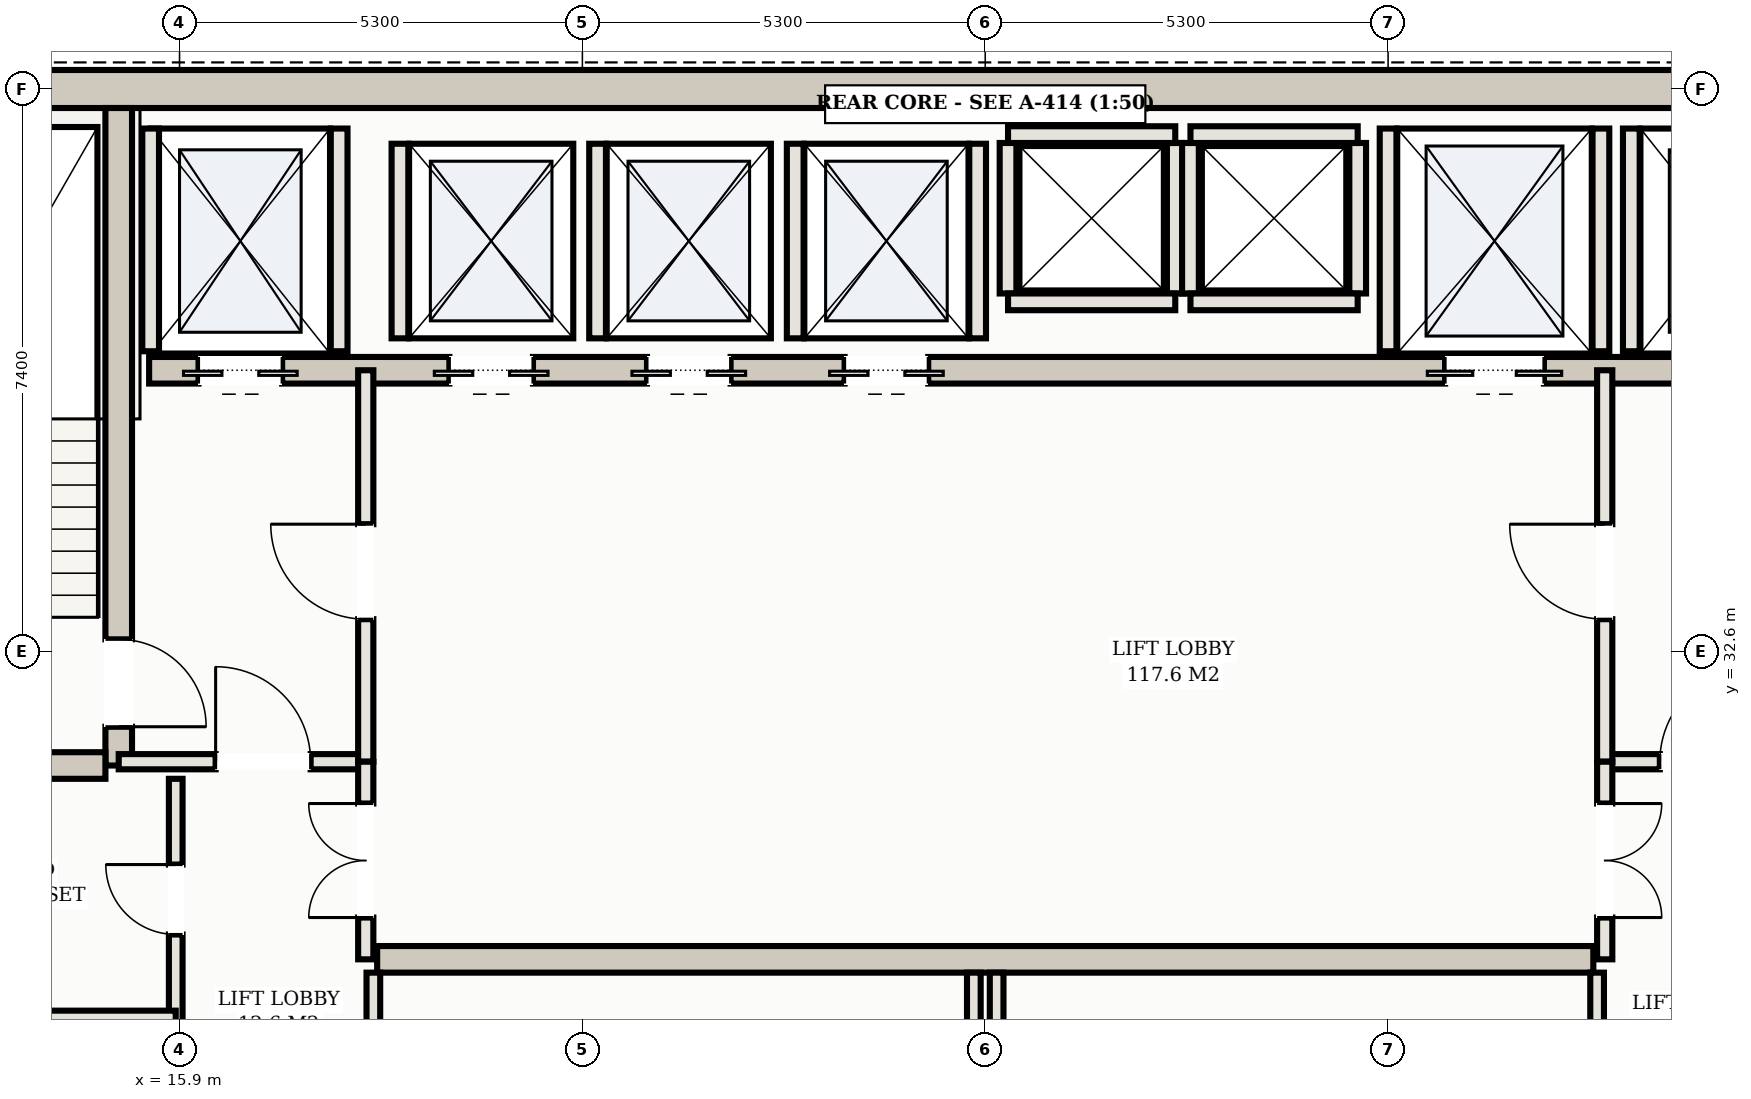
"""IFC4 building model, lengths in metres.
Left out: names, types, materials, properties, quantities, classifications, styles, units other than length and angle.
Written with IfcOpenShell. Run it as: python <this file> out.ifc"""

import sys

from ifc_helpers import new_model, si_unit, direction, frame, frame_2d, origin, place, context, subcontext, project, spatial, rectangle, extrude, element, fill, save


model = new_model("IFC4")
c1 = context("Model", 3, precision=1e-05, world=origin(), true_north=direction((0.0, 1.0)))
c2 = subcontext(c1, "Body", "Model", "MODEL_VIEW")
j1 = project(units=[si_unit("LENGTHUNIT", "METRE"), si_unit("PLANEANGLEUNIT", "RADIAN")], contexts=[c1])
p1 = place(None, origin())
s1 = spatial("IfcSite", under=j1, at=p1, CompositionType="ELEMENT")
p2 = place(p1, origin())
s2 = spatial("IfcBuilding", under=s1, at=p2, CompositionType="ELEMENT")
p3 = place(p2, frame((0.0, 0.0, 252.8)))
s3 = spatial("IfcBuildingStorey", under=s2, at=p3, CompositionType="ELEMENT", Elevation=252.8)
p4 = place(p3, frame((10.35, 40.0, 0.0), z_axis=(0.0, 0.0, 1.0), x_axis=(1.0, 0.0, 0.0)))
e1 = element("IfcWall", 1, at=p4, inside=s3, PredefinedType="SHEAR", context=c2, shape_type="SweptSolid", body=[
    extrude(rectangle(XDim=32.3, YDim=0.5, at=frame_2d((16.15, 0.0))), origin(), (0.0, 0.0, 1.0), 3.11),
])
p5 = place(p3, frame((15.1, 31.1, 0.0), z_axis=(0.0, 0.0, 1.0), x_axis=(0.0, 1.0, 0.0)))
e2 = element("IfcWall", 2, at=p5, inside=s3, PredefinedType="SHEAR", context=c2, shape_type="SweptSolid", body=[
    extrude(rectangle(XDim=8.65, YDim=0.35, at=frame_2d((4.325, 0.0))), origin(), (0.0, 0.0, 1.0), 3.11),
])
p6 = place(p5, frame((0.51, 0.0, 0.0)))
e3 = element("IfcOpeningElement", 3, at=p6, cuts=e2, PredefinedType="OPENING", context=c2, shape_type="SweptSolid", body=[
    extrude(rectangle(XDim=1.15, YDim=2.2, at=frame_2d((0.575, 1.1))), frame((0.0, 0.185, 0.0), z_axis=(0.0, -1.0, 0.0), x_axis=(1.0, 0.0, 0.0)), (0.0, 0.0, 1.0), 0.37),
])
p7 = place(p3, frame((10.85, 31.1, 0.0), z_axis=(0.0, 0.0, 1.0), x_axis=(1.0, 0.0, 0.0)))
e4 = element("IfcWall", 4, at=p7, inside=s3, PredefinedType="SHEAR", context=c2, shape_type="SweptSolid", body=[
    extrude(rectangle(XDim=4.075, YDim=0.35, at=frame_2d((2.038, 0.0))), origin(), (0.0, 0.0, 1.0), 3.11),
])
p8 = place(p3, frame((15.5, 36.3, 0.0), z_axis=(0.0, 0.0, 1.0), x_axis=(1.0, 0.0, 0.0)))
e5 = element("IfcWall", 5, at=p8, inside=s3, PredefinedType="SHEAR", context=c2, shape_type="SweptSolid", body=[
    extrude(rectangle(XDim=22.0, YDim=0.35, at=frame_2d((11.0, 0.0))), origin(), (0.0, 0.0, 1.0), 3.11),
])
p9 = place(p8, frame((0.65, 0.0, 0.0)))
e6 = element("IfcOpeningElement", 6, at=p9, cuts=e5, PredefinedType="OPENING", context=c2, shape_type="SweptSolid", body=[
    extrude(rectangle(XDim=1.1, YDim=2.15, at=frame_2d((0.55, 1.075))), frame((0.0, 0.185, 0.0), z_axis=(0.0, -1.0, 0.0), x_axis=(1.0, 0.0, 0.0)), (0.0, 0.0, 1.0), 0.37),
])
p10 = place(p8, frame((20.25, 0.0, 0.0)))
e7 = element("IfcOpeningElement", 7, at=p10, cuts=e5, PredefinedType="OPENING", context=c2, shape_type="SweptSolid", body=[
    extrude(rectangle(XDim=1.1, YDim=2.15, at=frame_2d((0.55, 1.075))), frame((0.0, 0.185, 0.0), z_axis=(0.0, -1.0, 0.0), x_axis=(1.0, 0.0, 0.0)), (0.0, 0.0, 1.0), 0.37),
])
p11 = place(p8, frame((17.05, 0.0, 0.0)))
e8 = element("IfcOpeningElement", 8, at=p11, cuts=e5, PredefinedType="OPENING", context=c2, shape_type="SweptSolid", body=[
    extrude(rectangle(XDim=1.3, YDim=2.2, at=frame_2d((0.65, 1.1))), frame((0.0, 0.185, 0.0), z_axis=(0.0, -1.0, 0.0), x_axis=(1.0, 0.0, 0.0)), (0.0, 0.0, 1.0), 0.37),
])
p12 = place(p8, frame((3.95, 0.0, 0.0)))
e9 = element("IfcOpeningElement", 9, at=p12, cuts=e5, PredefinedType="OPENING", context=c2, shape_type="SweptSolid", body=[
    extrude(rectangle(XDim=1.1, YDim=2.15, at=frame_2d((0.55, 1.075))), frame((0.0, 0.185, 0.0), z_axis=(0.0, -1.0, 0.0), x_axis=(1.0, 0.0, 0.0)), (0.0, 0.0, 1.0), 0.37),
])
p13 = place(p8, frame((6.55, 0.0, 0.0)))
e10 = element("IfcOpeningElement", 10, at=p13, cuts=e5, PredefinedType="OPENING", context=c2, shape_type="SweptSolid", body=[
    extrude(rectangle(XDim=1.1, YDim=2.15, at=frame_2d((0.55, 1.075))), frame((0.0, 0.185, 0.0), z_axis=(0.0, -1.0, 0.0), x_axis=(1.0, 0.0, 0.0)), (0.0, 0.0, 1.0), 0.37),
])
p14 = place(p8, frame((9.15, 0.0, 0.0)))
e11 = element("IfcOpeningElement", 11, at=p14, cuts=e5, PredefinedType="OPENING", context=c2, shape_type="SweptSolid", body=[
    extrude(rectangle(XDim=1.1, YDim=2.15, at=frame_2d((0.55, 1.075))), frame((0.0, 0.185, 0.0), z_axis=(0.0, -1.0, 0.0), x_axis=(1.0, 0.0, 0.0)), (0.0, 0.0, 1.0), 0.37),
])
p15 = place(p3, frame((18.5, 28.55, 0.0), z_axis=(0.0, 0.0, 1.0), x_axis=(1.0, 0.0, 0.0)))
e12 = element("IfcWall", 12, at=p15, inside=s3, PredefinedType="SHEAR", context=c2, shape_type="SweptSolid", body=[
    extrude(rectangle(XDim=16.0, YDim=0.35, at=frame_2d((8.0, 0.0))), origin(), (0.0, 0.0, 1.0), 3.11),
])
for number, where, z_axis, x_axis in (
    (13, (15.52, 36.55, 0.0), (0.0, 0.0, 1.0), (0.0, 1.0, 0.0)),
    (14, (18.0, 36.55, 0.0), (0.0, 0.0, 1.0), (0.0, 1.0, 0.0)),
    (15, (35.0, 36.55, 0.0), (0.0, 0.0, 1.0), (0.0, 1.0, 0.0)),
    (16, (31.8, 36.55, 0.0), (0.0, 0.0, 1.0), (0.0, 1.0, 0.0)),
    (17, (34.6, 36.55, 0.0), (0.0, 0.0, 1.0), (0.0, 1.0, 0.0)),
):
    element("IfcWall", number, at=place(p3, frame(where, z_axis=z_axis, x_axis=x_axis)), inside=s3, PredefinedType="SOLIDWALL", context=c2, shape_type="SweptSolid", body=[
        extrude(rectangle(XDim=2.93, YDim=0.22, at=frame_2d((1.465, 0.0))), origin(), (0.0, 0.0, 1.0), 3.11),
    ])
for number, where, z_axis, x_axis in (
    (18, (18.8, 36.72, 0.0), (0.0, 0.0, 1.0), (0.0, 1.0, 0.0)),
    (19, (21.4, 36.72, 0.0), (0.0, 0.0, 1.0), (0.0, 1.0, 0.0)),
    (20, (24.0, 36.72, 0.0), (0.0, 0.0, 1.0), (0.0, 1.0, 0.0)),
    (21, (26.4, 36.72, 0.0), (0.0, 0.0, 1.0), (0.0, 1.0, 0.0)),
):
    element("IfcWall", number, at=place(p3, frame(where, z_axis=z_axis, x_axis=x_axis)), inside=s3, PredefinedType="SOLIDWALL", context=c2, shape_type="SweptSolid", body=[
        extrude(rectangle(XDim=2.56, YDim=0.22, at=frame_2d((1.28, 0.0))), origin(), (0.0, 0.0, 1.0), 3.11),
    ])
for number, where, z_axis, x_axis in (
    (22, (26.8, 37.31, 0.0), (0.0, 0.0, 1.0), (0.0, 1.0, 0.0)),
    (23, (29.0, 37.31, 0.0), (0.0, 0.0, 1.0), (0.0, 1.0, 0.0)),
):
    element("IfcWall", number, at=place(p3, frame(where, z_axis=z_axis, x_axis=x_axis)), inside=s3, PredefinedType="SOLIDWALL", context=c2, shape_type="SweptSolid", body=[
        extrude(rectangle(XDim=1.98, YDim=0.22, at=frame_2d((0.99, 0.0))), origin(), (0.0, 0.0, 1.0), 3.11),
    ])
for number, where, z_axis, x_axis in (
    (24, (26.8, 39.4, 0.0), (0.0, 0.0, 1.0), (1.0, 0.0, 0.0)),
    (25, (26.8, 37.2, 0.0), (0.0, 0.0, 1.0), (1.0, 0.0, 0.0)),
):
    element("IfcWall", number, at=place(p3, frame(where, z_axis=z_axis, x_axis=x_axis)), inside=s3, PredefinedType="SOLIDWALL", context=c2, shape_type="SweptSolid", body=[
        extrude(rectangle(XDim=2.2, YDim=0.22, at=frame_2d((1.1, 0.0))), origin(), (0.0, 0.0, 1.0), 3.11),
    ])
for number, where, z_axis, x_axis in (
    (26, (29.2, 37.31, 0.0), (0.0, 0.0, 1.0), (0.0, 1.0, 0.0)),
    (27, (31.4, 37.31, 0.0), (0.0, 0.0, 1.0), (0.0, 1.0, 0.0)),
):
    element("IfcWall", number, at=place(p3, frame(where, z_axis=z_axis, x_axis=x_axis)), inside=s3, PredefinedType="SOLIDWALL", context=c2, shape_type="SweptSolid", body=[
        extrude(rectangle(XDim=1.98, YDim=0.22, at=frame_2d((0.99, 0.0))), origin(), (0.0, 0.0, 1.0), 3.11),
    ])
for number, where, z_axis, x_axis in (
    (28, (29.2, 39.4, 0.0), (0.0, 0.0, 1.0), (1.0, 0.0, 0.0)),
    (29, (29.2, 37.2, 0.0), (0.0, 0.0, 1.0), (1.0, 0.0, 0.0)),
):
    element("IfcWall", number, at=place(p3, frame(where, z_axis=z_axis, x_axis=x_axis)), inside=s3, PredefinedType="SOLIDWALL", context=c2, shape_type="SweptSolid", body=[
        extrude(rectangle(XDim=2.2, YDim=0.22, at=frame_2d((1.1, 0.0))), origin(), (0.0, 0.0, 1.0), 3.11),
    ])
p16 = place(p3, frame((15.1, 31.15, 0.0), z_axis=(0.0, 0.0, 1.0), x_axis=(1.0, 0.0, 0.0)))
e30 = element("IfcWall", 30, at=p16, inside=s3, PredefinedType="PARTITIONING", context=c2, shape_type="SweptSolid", body=[
    extrude(rectangle(XDim=3.25, YDim=0.2, at=frame_2d((1.625, 0.0))), origin(), (0.0, 0.0, 1.0), 2.45),
])
p17 = place(p16, frame((1.275, 0.0, 0.0)))
e31 = element("IfcOpeningElement", 31, at=p17, cuts=e30, PredefinedType="OPENING", context=c2, shape_type="SweptSolid", body=[
    extrude(rectangle(XDim=1.25, YDim=2.2, at=frame_2d((0.625, 1.1))), frame((0.0, 0.11, 0.0), z_axis=(0.0, -1.0, 0.0), x_axis=(1.0, 0.0, 0.0)), (0.0, 0.0, 1.0), 0.22),
])
p18 = place(p3, frame((18.35, 31.15, 0.0), z_axis=(0.0, 0.0, 1.0), x_axis=(0.0, 1.0, 0.0)))
e32 = element("IfcWall", 32, at=p18, inside=s3, PredefinedType="PARTITIONING", context=c2, shape_type="SweptSolid", body=[
    extrude(rectangle(XDim=5.15, YDim=0.2, at=frame_2d((2.575, 0.0))), origin(), (0.0, 0.0, 1.0), 2.45),
])
p19 = place(p18, frame((1.875, 0.0, 0.0)))
e33 = element("IfcOpeningElement", 33, at=p19, cuts=e32, PredefinedType="OPENING", context=c2, shape_type="SweptSolid", body=[
    extrude(rectangle(XDim=1.25, YDim=2.2, at=frame_2d((0.625, 1.1))), frame((0.0, 0.11, 0.0), z_axis=(0.0, -1.0, 0.0), x_axis=(1.0, 0.0, 0.0)), (0.0, 0.0, 1.0), 0.22),
])
p20 = place(p3, frame((34.65, 31.15, 0.0), z_axis=(0.0, 0.0, 1.0), x_axis=(1.0, 0.0, 0.0)))
e34 = element("IfcWall", 34, at=p20, inside=s3, PredefinedType="PARTITIONING", context=c2, shape_type="SweptSolid", body=[
    extrude(rectangle(XDim=3.25, YDim=0.2, at=frame_2d((1.625, 0.0))), origin(), (0.0, 0.0, 1.0), 2.45),
])
p21 = place(p20, frame((0.725, 0.0, 0.0)))
e35 = element("IfcOpeningElement", 35, at=p21, cuts=e34, PredefinedType="OPENING", context=c2, shape_type="SweptSolid", body=[
    extrude(rectangle(XDim=1.25, YDim=2.2, at=frame_2d((0.625, 1.1))), frame((0.0, 0.11, 0.0), z_axis=(0.0, -1.0, 0.0), x_axis=(1.0, 0.0, 0.0)), (0.0, 0.0, 1.0), 0.22),
])
p22 = place(p3, frame((34.65, 31.15, 0.0), z_axis=(0.0, 0.0, 1.0), x_axis=(0.0, 1.0, 0.0)))
e36 = element("IfcWall", 36, at=p22, inside=s3, PredefinedType="PARTITIONING", context=c2, shape_type="SweptSolid", body=[
    extrude(rectangle(XDim=5.15, YDim=0.2, at=frame_2d((2.575, 0.0))), origin(), (0.0, 0.0, 1.0), 2.45),
])
p23 = place(p22, frame((1.875, 0.0, 0.0)))
e37 = element("IfcOpeningElement", 37, at=p23, cuts=e36, PredefinedType="OPENING", context=c2, shape_type="SweptSolid", body=[
    extrude(rectangle(XDim=1.25, YDim=2.2, at=frame_2d((0.625, 1.1))), frame((0.0, 0.11, 0.0), z_axis=(0.0, -1.0, 0.0), x_axis=(1.0, 0.0, 0.0)), (0.0, 0.0, 1.0), 0.22),
])
p24 = place(p3, frame((15.85, 25.45, 0.0), z_axis=(0.0, 0.0, 1.0), x_axis=(0.0, 1.0, 0.0)))
e38 = element("IfcWall", 38, at=p24, inside=s3, PredefinedType="PARTITIONING", context=c2, shape_type="SweptSolid", body=[
    extrude(rectangle(XDim=5.475, YDim=0.18, at=frame_2d((2.738, 0.0))), origin(), (0.0, 0.0, 1.0), 2.45),
])
p25 = place(p24, frame((0.74, 0.0, 0.0)))
e39 = element("IfcOpeningElement", 39, at=p25, cuts=e38, PredefinedType="OPENING", context=c2, shape_type="SweptSolid", body=[
    extrude(rectangle(XDim=0.92, YDim=2.15, at=frame_2d((0.46, 1.075))), frame((0.0, 0.1, 0.0), z_axis=(0.0, -1.0, 0.0), x_axis=(1.0, 0.0, 0.0)), (0.0, 0.0, 1.0), 0.2),
])
p26 = place(p24, frame((3.427, 0.0, 0.0)))
e40 = element("IfcOpeningElement", 40, at=p26, cuts=e38, PredefinedType="OPENING", context=c2, shape_type="SweptSolid", body=[
    extrude(rectangle(XDim=0.92, YDim=2.15, at=frame_2d((0.46, 1.075))), frame((0.0, 0.1, 0.0), z_axis=(0.0, -1.0, 0.0), x_axis=(1.0, 0.0, 0.0)), (0.0, 0.0, 1.0), 0.2),
])
p27 = place(p3, frame((10.85, 27.8, 0.0), z_axis=(0.0, 0.0, 1.0), x_axis=(1.0, 0.0, 0.0)))
e41 = element("IfcWall", 41, at=p27, inside=s3, PredefinedType="PARTITIONING", context=c2, shape_type="SweptSolid", body=[
    extrude(rectangle(XDim=5.0, YDim=0.15, at=frame_2d((2.5, 0.0))), origin(), (0.0, 0.0, 1.0), 2.45),
])
p28 = place(p3, frame((18.35, 28.55, 0.0), z_axis=(0.0, 0.0, 1.0), x_axis=(0.0, 1.0, 0.0)))
e42 = element("IfcWall", 42, at=p28, inside=s3, PredefinedType="PARTITIONING", context=c2, shape_type="SweptSolid", body=[
    extrude(rectangle(XDim=2.6, YDim=0.2, at=frame_2d((1.3, 0.0))), origin(), (0.0, 0.0, 1.0), 2.45),
])
p29 = place(p28, frame((0.55, 0.0, 0.0)))
e43 = element("IfcOpeningElement", 43, at=p29, cuts=e42, PredefinedType="OPENING", context=c2, shape_type="SweptSolid", body=[
    extrude(rectangle(XDim=1.5, YDim=2.25, at=frame_2d((0.75, 1.125))), frame((0.0, 0.11, 0.0), z_axis=(0.0, -1.0, 0.0), x_axis=(1.0, 0.0, 0.0)), (0.0, 0.0, 1.0), 0.22),
])
p30 = place(p3, frame((34.65, 28.55, 0.0), z_axis=(0.0, 0.0, 1.0), x_axis=(0.0, 1.0, 0.0)))
e44 = element("IfcWall", 44, at=p30, inside=s3, PredefinedType="PARTITIONING", context=c2, shape_type="SweptSolid", body=[
    extrude(rectangle(XDim=2.6, YDim=0.2, at=frame_2d((1.3, 0.0))), origin(), (0.0, 0.0, 1.0), 2.45),
])
p31 = place(p30, frame((0.55, 0.0, 0.0)))
e45 = element("IfcOpeningElement", 45, at=p31, cuts=e44, PredefinedType="OPENING", context=c2, shape_type="SweptSolid", body=[
    extrude(rectangle(XDim=1.5, YDim=2.25, at=frame_2d((0.75, 1.125))), frame((0.0, 0.11, 0.0), z_axis=(0.0, -1.0, 0.0), x_axis=(1.0, 0.0, 0.0)), (0.0, 0.0, 1.0), 0.22),
])
for number, where, z_axis, x_axis in (
    (46, (18.45, 25.62, 0.0), (0.0, 0.0, 1.0), (0.0, 1.0, 0.0)),
    (47, (26.35, 25.62, 0.0), (0.0, 0.0, 1.0), (0.0, 1.0, 0.0)),
    (48, (26.65, 25.62, 0.0), (0.0, 0.0, 1.0), (0.0, 1.0, 0.0)),
    (49, (34.55, 25.62, 0.0), (0.0, 0.0, 1.0), (0.0, 1.0, 0.0)),
):
    element("IfcWall", number, at=place(p3, frame(where, z_axis=z_axis, x_axis=x_axis)), inside=s3, PredefinedType="PARTITIONING", context=c2, shape_type="SweptSolid", body=[
        extrude(rectangle(XDim=2.755, YDim=0.18, at=frame_2d((1.377, 0.0))), origin(), (0.0, 0.0, 1.0), 2.45),
    ])
p32 = place(p9, frame((1.1, 0.0, 0.0), z_axis=(0.0, 0.0, 1.0), x_axis=(-1.0, 0.0, 0.0)))
e50 = element("IfcDoor", 50, at=p32, inside=s3, OperationType="DOUBLE_DOOR_SLIDING", PredefinedType="DOOR", context=c2, shape_type="SweptSolid", body=[
    extrude(rectangle(XDim=1.1, YDim=2.15, at=frame_2d((0.55, 1.075))), frame((0.0, 0.025, 0.0), z_axis=(0.0, -1.0, 0.0), x_axis=(1.0, 0.0, 0.0)), (0.0, 0.0, 1.0), 0.05),
])
fill(e6, e50)
p33 = place(p11, frame((1.3, 0.0, 0.0), z_axis=(0.0, 0.0, 1.0), x_axis=(-1.0, 0.0, 0.0)))
e51 = element("IfcDoor", 51, at=p33, inside=s3, OperationType="DOUBLE_DOOR_SLIDING", PredefinedType="DOOR", context=c2, shape_type="SweptSolid", body=[
    extrude(rectangle(XDim=1.3, YDim=2.2, at=frame_2d((0.65, 1.1))), frame((0.0, 0.025, 0.0), z_axis=(0.0, -1.0, 0.0), x_axis=(1.0, 0.0, 0.0)), (0.0, 0.0, 1.0), 0.05),
])
fill(e8, e51)
p34 = place(p12, frame((1.1, 0.0, 0.0), z_axis=(0.0, 0.0, 1.0), x_axis=(-1.0, 0.0, 0.0)))
e52 = element("IfcDoor", 52, at=p34, inside=s3, OperationType="DOUBLE_DOOR_SLIDING", PredefinedType="DOOR", context=c2, shape_type="SweptSolid", body=[
    extrude(rectangle(XDim=1.1, YDim=2.15, at=frame_2d((0.55, 1.075))), frame((0.0, 0.025, 0.0), z_axis=(0.0, -1.0, 0.0), x_axis=(1.0, 0.0, 0.0)), (0.0, 0.0, 1.0), 0.05),
])
fill(e9, e52)
p35 = place(p13, frame((1.1, 0.0, 0.0), z_axis=(0.0, 0.0, 1.0), x_axis=(-1.0, 0.0, 0.0)))
e53 = element("IfcDoor", 53, at=p35, inside=s3, OperationType="DOUBLE_DOOR_SLIDING", PredefinedType="DOOR", context=c2, shape_type="SweptSolid", body=[
    extrude(rectangle(XDim=1.1, YDim=2.15, at=frame_2d((0.55, 1.075))), frame((0.0, 0.025, 0.0), z_axis=(0.0, -1.0, 0.0), x_axis=(1.0, 0.0, 0.0)), (0.0, 0.0, 1.0), 0.05),
])
fill(e10, e53)
p36 = place(p14, frame((1.1, 0.0, 0.0), z_axis=(0.0, 0.0, 1.0), x_axis=(-1.0, 0.0, 0.0)))
e54 = element("IfcDoor", 54, at=p36, inside=s3, OperationType="DOUBLE_DOOR_SLIDING", PredefinedType="DOOR", context=c2, shape_type="SweptSolid", body=[
    extrude(rectangle(XDim=1.1, YDim=2.15, at=frame_2d((0.55, 1.075))), frame((0.0, 0.025, 0.0), z_axis=(0.0, -1.0, 0.0), x_axis=(1.0, 0.0, 0.0)), (0.0, 0.0, 1.0), 0.05),
])
fill(e11, e54)
p37 = place(p17, origin())
e55 = element("IfcDoor", 55, at=p37, inside=s3, OperationType="SINGLE_SWING_LEFT", PredefinedType="DOOR", context=c2, shape_type="SweptSolid", body=[
    extrude(rectangle(XDim=1.25, YDim=2.2, at=frame_2d((0.625, 1.1))), frame((0.0, 0.025, 0.0), z_axis=(0.0, -1.0, 0.0), x_axis=(1.0, 0.0, 0.0)), (0.0, 0.0, 1.0), 0.05),
])
fill(e31, e55)
p38 = place(p19, origin())
e56 = element("IfcDoor", 56, at=p38, inside=s3, OperationType="SINGLE_SWING_RIGHT", PredefinedType="DOOR", context=c2, shape_type="SweptSolid", body=[
    extrude(rectangle(XDim=1.25, YDim=2.2, at=frame_2d((0.625, 1.1))), frame((0.0, 0.025, 0.0), z_axis=(0.0, -1.0, 0.0), x_axis=(1.0, 0.0, 0.0)), (0.0, 0.0, 1.0), 0.05),
])
fill(e33, e56)
p39 = place(p21, origin())
e57 = element("IfcDoor", 57, at=p39, inside=s3, OperationType="SINGLE_SWING_RIGHT", PredefinedType="DOOR", context=c2, shape_type="SweptSolid", body=[
    extrude(rectangle(XDim=1.25, YDim=2.2, at=frame_2d((0.625, 1.1))), frame((0.0, 0.025, 0.0), z_axis=(0.0, -1.0, 0.0), x_axis=(1.0, 0.0, 0.0)), (0.0, 0.0, 1.0), 0.05),
])
fill(e35, e57)
p40 = place(p23, origin())
e58 = element("IfcDoor", 58, at=p40, inside=s3, OperationType="SINGLE_SWING_RIGHT", PredefinedType="DOOR", context=c2, shape_type="SweptSolid", body=[
    extrude(rectangle(XDim=1.25, YDim=2.2, at=frame_2d((0.625, 1.1))), frame((0.0, 0.025, 0.0), z_axis=(0.0, -1.0, 0.0), x_axis=(1.0, 0.0, 0.0)), (0.0, 0.0, 1.0), 0.05),
])
fill(e37, e58)
p41 = place(p6, frame((1.15, 0.0, 0.0), z_axis=(0.0, 0.0, 1.0), x_axis=(-1.0, 0.0, 0.0)))
e59 = element("IfcDoor", 59, at=p41, inside=s3, OperationType="SINGLE_SWING_RIGHT", PredefinedType="DOOR", context=c2, shape_type="SweptSolid", body=[
    extrude(rectangle(XDim=1.15, YDim=2.2, at=frame_2d((0.575, 1.1))), frame((0.0, 0.025, 0.0), z_axis=(0.0, -1.0, 0.0), x_axis=(1.0, 0.0, 0.0)), (0.0, 0.0, 1.0), 0.05),
])
fill(e3, e59)
p42 = place(p26, origin())
e60 = element("IfcDoor", 60, at=p42, inside=s3, OperationType="SINGLE_SWING_RIGHT", PredefinedType="DOOR", context=c2, shape_type="SweptSolid", body=[
    extrude(rectangle(XDim=0.92, YDim=2.15, at=frame_2d((0.46, 1.075))), frame((0.0, 0.025, 0.0), z_axis=(0.0, -1.0, 0.0), x_axis=(1.0, 0.0, 0.0)), (0.0, 0.0, 1.0), 0.05),
])
fill(e40, e60)
p43 = place(p29, origin())
e61 = element("IfcDoor", 61, at=p43, inside=s3, OperationType="DOUBLE_DOOR_SINGLE_SWING", PredefinedType="DOOR", context=c2, shape_type="SweptSolid", body=[
    extrude(rectangle(XDim=1.5, YDim=2.25, at=frame_2d((0.75, 1.125))), frame((0.0, 0.025, 0.0), z_axis=(0.0, -1.0, 0.0), x_axis=(1.0, 0.0, 0.0)), (0.0, 0.0, 1.0), 0.05),
])
fill(e43, e61)
p44 = place(p31, frame((1.5, 0.0, 0.0), z_axis=(0.0, 0.0, 1.0), x_axis=(-1.0, 0.0, 0.0)))
e62 = element("IfcDoor", 62, at=p44, inside=s3, OperationType="DOUBLE_DOOR_SINGLE_SWING", PredefinedType="DOOR", context=c2, shape_type="SweptSolid", body=[
    extrude(rectangle(XDim=1.5, YDim=2.25, at=frame_2d((0.75, 1.125))), frame((0.0, 0.025, 0.0), z_axis=(0.0, -1.0, 0.0), x_axis=(1.0, 0.0, 0.0)), (0.0, 0.0, 1.0), 0.05),
])
fill(e45, e62)
save(model, sys.argv[1])
